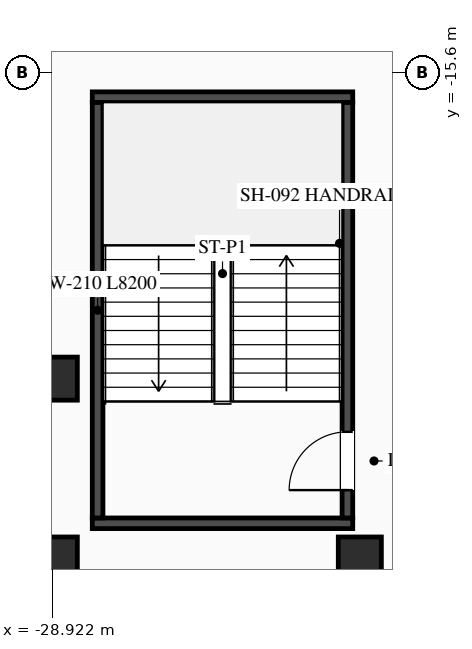
"""IFC4 building model, lengths in metres.
Left out: names, types, materials, properties, quantities, classifications, styles, units other than length and angle.
Written with IfcOpenShell. Run it as: python <this file> out.ifc"""

import sys

from ifc_helpers import new_model, si_unit, direction, frame, frame_2d, origin, origin_2d, place, context, subcontext, project, spatial, rectangle, i_section, extrude, element, fill, save


model = new_model("IFC4")
c1 = context("Model", 3, precision=1e-05, world=origin(), true_north=direction((0.0, 1.0)))
c2 = subcontext(c1, "Body", "Model", "MODEL_VIEW")
j1 = project(units=[si_unit("LENGTHUNIT", "METRE"), si_unit("PLANEANGLEUNIT", "RADIAN")], contexts=[c1])
p1 = place(None, origin())
s1 = spatial("IfcSite", under=j1, at=p1, CompositionType="ELEMENT")
p2 = place(p1, origin())
s2 = spatial("IfcBuilding", under=s1, at=p2, CompositionType="ELEMENT")
p3 = place(p2, frame((0.0, 0.0, 14.1)))
s3 = spatial("IfcBuildingStorey", under=s2, at=p3, CompositionType="ELEMENT", Elevation=14.1)
for number, where, z_axis, x_axis in (
    (1, (-28.13, -24.505, 0.0), (0.0, 0.0, 1.0), (1.0, 0.0, 0.0)),
    (2, (-28.13, -16.095, 0.0), (0.0, 0.0, 1.0), (1.0, 0.0, 0.0)),
):
    element("IfcWall", number, at=place(p3, frame(where, z_axis=z_axis, x_axis=x_axis)), inside=s3, PredefinedType="SHEAR", context=c2, shape_type="SweptSolid", body=[
        extrude(rectangle(XDim=5.14, YDim=0.21, at=frame_2d((2.57, 0.0))), origin(), (0.0, 0.0, 1.0), 4.25),
    ])
p4 = place(p3, frame((-28.025, -24.4, 0.0), z_axis=(0.0, 0.0, 1.0), x_axis=(0.0, 1.0, 0.0)))
e3 = element("IfcWall", 3, at=p4, inside=s3, PredefinedType="SHEAR", context=c2, shape_type="SweptSolid", body=[
    extrude(rectangle(XDim=8.2, YDim=0.21, at=frame_2d((4.1, 0.0))), origin(), (0.0, 0.0, 1.0), 4.25),
])
p5 = place(p3, frame((-23.095, -24.4, 0.0), z_axis=(0.0, 0.0, 1.0), x_axis=(0.0, 1.0, 0.0)))
e4 = element("IfcWall", 4, at=p5, inside=s3, PredefinedType="SHEAR", context=c2, shape_type="SweptSolid", body=[
    extrude(rectangle(XDim=8.2, YDim=0.21, at=frame_2d((4.1, 0.0))), origin(), (0.0, 0.0, 1.0), 4.25),
])
p6 = place(p5, frame((0.55, 0.0, 0.0)))
e5 = element("IfcOpeningElement", 5, at=p6, cuts=e4, PredefinedType="OPENING", context=c2, shape_type="SweptSolid", body=[
    extrude(rectangle(XDim=1.15, YDim=2.1, at=frame_2d((0.575, 1.05))), frame((0.0, 0.115, 0.0), z_axis=(0.0, -1.0, 0.0), x_axis=(1.0, 0.0, 0.0)), (0.0, 0.0, 1.0), 0.23),
])
for number, where, z_axis, x_axis in (
    (6, (-28.85, -21.65, 0.0), (0.0, 0.0, 1.0), (1.0, 0.0, 0.0)),
    (7, (-28.85, -25.2, 0.0), (0.0, 0.0, 1.0), (1.0, 0.0, 0.0)),
    (8, (-22.85, -25.2, 0.0), (0.0, 0.0, 1.0), (1.0, 0.0, 0.0)),
):
    element("IfcColumn", number, at=place(p3, frame(where, z_axis=z_axis, x_axis=x_axis)), inside=s3, PredefinedType="COLUMN", context=c2, shape_type="SweptSolid", body=[
        extrude(i_section(OverallWidth=0.85, OverallDepth=0.85, WebThickness=0.032, FlangeThickness=0.048, at=origin_2d()), origin(), (0.0, 0.0, 1.0), 4.5),
    ])
p7 = place(p6, origin())
e9 = element("IfcDoor", 9, at=p7, inside=s3, OperationType="SINGLE_SWING_LEFT", PredefinedType="DOOR", context=c2, shape_type="SweptSolid", body=[
    extrude(rectangle(XDim=1.15, YDim=2.1, at=frame_2d((0.575, 1.05))), frame((0.0, 0.025, 0.0), z_axis=(0.0, -1.0, 0.0), x_axis=(1.0, 0.0, 0.0)), (0.0, 0.0, 1.0), 0.05),
])
fill(e5, e9)
save(model, sys.argv[1])
